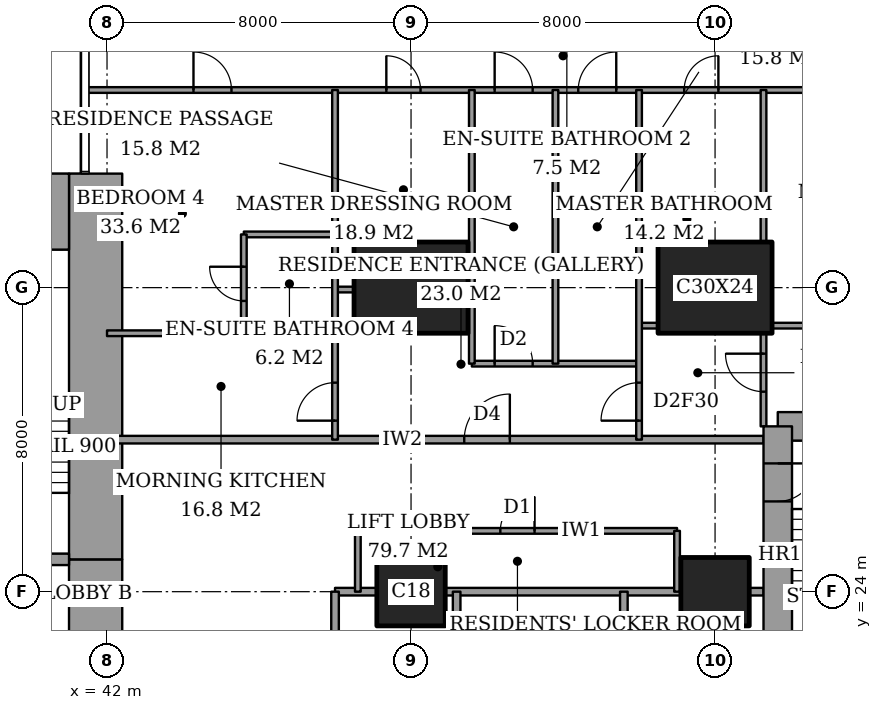
"""IFC4 building model, lengths in metres.
Left out: names, types, materials, properties, quantities, classifications, styles, units other than length and angle.
Written with IfcOpenShell. Run it as: python <this file> out.ifc"""

import sys

from ifc_helpers import new_model, si_unit, direction, frame, frame_2d, origin, origin_2d, place, context, subcontext, project, spatial, rectangle, extrude, element, fill, save


model = new_model("IFC4")
c1 = context("Model", 3, precision=1e-05, world=origin(), true_north=direction((0.0, 1.0)))
c2 = subcontext(c1, "Body", "Model", "MODEL_VIEW")
j1 = project(units=[si_unit("LENGTHUNIT", "METRE"), si_unit("PLANEANGLEUNIT", "RADIAN")], contexts=[c1])
p1 = place(None, origin())
s1 = spatial("IfcSite", under=j1, at=p1, CompositionType="ELEMENT")
p2 = place(p1, origin())
s2 = spatial("IfcBuilding", under=s1, at=p2, CompositionType="ELEMENT")
p3 = place(p2, frame((0.0, 0.0, 207.4)))
s3 = spatial("IfcBuildingStorey", under=s2, at=p3, CompositionType="ELEMENT", Elevation=207.4)
p4 = place(p3, frame((50.0, 24.0, 0.0), z_axis=(0.0, 0.0, 1.0), x_axis=(1.0, 0.0, 0.0)))
e1 = element("IfcColumn", 1, at=p4, inside=s3, PredefinedType="COLUMN", context=c2, shape_type="SweptSolid", body=[
    extrude(rectangle(XDim=1.8, YDim=1.8, at=origin_2d()), origin(), (0.0, 0.0, 1.0), 3.6),
])
p5 = place(p3, frame((50.0, 32.0, 0.0), z_axis=(0.0, 0.0, 1.0), x_axis=(1.0, 0.0, 0.0)))
e2 = element("IfcColumn", 2, at=p5, inside=s3, PredefinedType="COLUMN", context=c2, shape_type="SweptSolid", body=[
    extrude(rectangle(XDim=3.0, YDim=2.4, at=origin_2d()), origin(), (0.0, 0.0, 1.0), 3.6),
])
p6 = place(p3, frame((58.0, 24.0, 0.0), z_axis=(0.0, 0.0, 1.0), x_axis=(1.0, 0.0, 0.0)))
e3 = element("IfcColumn", 3, at=p6, inside=s3, PredefinedType="COLUMN", context=c2, shape_type="SweptSolid", body=[
    extrude(rectangle(XDim=1.8, YDim=1.8, at=origin_2d()), origin(), (0.0, 0.0, 1.0), 3.6),
])
p7 = place(p3, frame((58.0, 32.0, 0.0), z_axis=(0.0, 0.0, 1.0), x_axis=(1.0, 0.0, 0.0)))
e4 = element("IfcColumn", 4, at=p7, inside=s3, PredefinedType="COLUMN", context=c2, shape_type="SweptSolid", body=[
    extrude(rectangle(XDim=3.0, YDim=2.4, at=origin_2d()), origin(), (0.0, 0.0, 1.0), 3.6),
])
p8 = place(p3, frame((37.85, 34.0, 0.0), z_axis=(0.0, 0.0, 1.0), x_axis=(1.0, 0.0, 0.0)))
e5 = element("IfcWall", 5, at=p8, inside=s3, PredefinedType="SHEAR", context=c2, shape_type="SweptSolid", body=[
    extrude(rectangle(XDim=3.15, YDim=2.0, at=frame_2d((1.575, 0.0))), origin(), (0.0, 0.0, 1.0), 3.6),
])
p9 = place(p3, frame((41.7, 13.0, 0.0), z_axis=(0.0, 0.0, 1.0), x_axis=(0.0, 1.0, 0.0)))
e6 = element("IfcWall", 6, at=p9, inside=s3, PredefinedType="SHEAR", context=c2, shape_type="SweptSolid", body=[
    extrude(rectangle(XDim=11.85, YDim=1.4, at=frame_2d((5.925, 0.0))), origin(), (0.0, 0.0, 1.0), 3.6),
])
p10 = place(p9, frame((7.5, 0.0, 0.0)))
e7 = element("IfcOpeningElement", 7, at=p10, cuts=e6, PredefinedType="OPENING", context=c2, shape_type="SweptSolid", body=[
    extrude(rectangle(XDim=1.8, YDim=2.4, at=frame_2d((0.9, 1.2))), frame((0.0, 0.71, 0.0), z_axis=(0.0, -1.0, 0.0), x_axis=(1.0, 0.0, 0.0)), (0.0, 0.0, 1.0), 1.42),
])
p11 = place(p3, frame((41.7, 24.85, 0.0), z_axis=(0.0, 0.0, 1.0), x_axis=(0.0, 1.0, 0.0)))
e8 = element("IfcWall", 8, at=p11, inside=s3, PredefinedType="SHEAR", context=c2, shape_type="SweptSolid", body=[
    extrude(rectangle(XDim=10.15, YDim=1.4, at=frame_2d((5.075, 0.0))), origin(), (0.0, 0.0, 1.0), 3.6),
])
p12 = place(p3, frame((37.85, 24.85, 0.0), z_axis=(0.0, 0.0, 1.0), x_axis=(1.0, 0.0, 0.0)))
e9 = element("IfcWall", 9, at=p12, inside=s3, PredefinedType="SHEAR", context=c2, shape_type="SweptSolid", body=[
    extrude(rectangle(XDim=3.15, YDim=0.3, at=frame_2d((1.575, 0.0))), origin(), (0.0, 0.0, 1.0), 3.6),
])
p13 = place(p12, frame((0.95, 0.0, 0.0)))
e10 = element("IfcOpeningElement", 10, at=p13, cuts=e9, PredefinedType="OPENING", context=c2, shape_type="SweptSolid", body=[
    extrude(rectangle(XDim=1.0, YDim=2.1, at=frame_2d((0.5, 1.05))), frame((0.0, 0.16, 0.0), z_axis=(0.0, -1.0, 0.0), x_axis=(1.0, 0.0, 0.0)), (0.0, 0.0, 1.0), 0.32),
])
p14 = place(p3, frame((64.1, 28.35, 0.0), z_axis=(0.0, 0.0, 1.0), x_axis=(-1.0, 0.0, 0.0)))
e11 = element("IfcWall", 11, at=p14, inside=s3, PredefinedType="SHEAR", context=c2, shape_type="SweptSolid", body=[
    extrude(rectangle(XDim=4.45, YDim=0.75, at=frame_2d((2.225, 0.0))), origin(), (0.0, 0.0, 1.0), 3.6),
])
p15 = place(p3, frame((59.65, 28.35, 0.0), z_axis=(0.0, 0.0, 1.0), x_axis=(0.0, -1.0, 0.0)))
e12 = element("IfcWall", 12, at=p15, inside=s3, PredefinedType="SHEAR", context=c2, shape_type="SweptSolid", body=[
    extrude(rectangle(XDim=8.7, YDim=0.75, at=frame_2d((4.35, 0.0))), origin(), (0.0, 0.0, 1.0), 3.6),
])
p16 = place(p15, frame((0.975, 0.0, 0.0)))
e13 = element("IfcOpeningElement", 13, at=p16, cuts=e12, PredefinedType="OPENING", context=c2, shape_type="SweptSolid", body=[
    extrude(rectangle(XDim=1.0, YDim=2.1, at=frame_2d((0.5, 1.05))), frame((0.0, 0.385, 0.0), z_axis=(0.0, -1.0, 0.0), x_axis=(1.0, 0.0, 0.0)), (0.0, 0.0, 1.0), 0.77),
])
p17 = place(p3, frame((48.0, 24.0, 0.0), z_axis=(0.0, 0.0, 1.0), x_axis=(1.0, 0.0, 0.0)))
e14 = element("IfcWall", 14, at=p17, inside=s3, PredefinedType="PARTITIONING", context=c2, shape_type="SweptSolid", body=[
    extrude(rectangle(XDim=1.1, YDim=0.2, at=frame_2d((0.55, 0.0))), origin(), (0.0, 0.0, 1.0), 3.35),
])
p18 = place(p3, frame((50.9, 24.0, 0.0), z_axis=(0.0, 0.0, 1.0), x_axis=(1.0, 0.0, 0.0)))
e15 = element("IfcWall", 15, at=p18, inside=s3, PredefinedType="PARTITIONING", context=c2, shape_type="SweptSolid", body=[
    extrude(rectangle(XDim=6.2, YDim=0.2, at=frame_2d((3.1, 0.0))), origin(), (0.0, 0.0, 1.0), 3.35),
])
p19 = place(p3, frame((58.9, 24.0, 0.0), z_axis=(0.0, 0.0, 1.0), x_axis=(1.0, 0.0, 0.0)))
e16 = element("IfcWall", 16, at=p19, inside=s3, PredefinedType="PARTITIONING", context=c2, shape_type="SweptSolid", body=[
    extrude(rectangle(XDim=0.375, YDim=0.2, at=frame_2d((0.188, 0.0))), origin(), (0.0, 0.0, 1.0), 3.35),
])
p20 = place(p3, frame((48.6, 25.6, 0.0), z_axis=(0.0, 0.0, 1.0), x_axis=(1.0, 0.0, 0.0)))
e17 = element("IfcWall", 17, at=p20, inside=s3, PredefinedType="PARTITIONING", context=c2, shape_type="SweptSolid", body=[
    extrude(rectangle(XDim=8.4, YDim=0.15, at=frame_2d((4.2, 0.0))), origin(), (0.0, 0.0, 1.0), 3.35),
])
p21 = place(p20, frame((3.75, 0.0, 0.0)))
e18 = element("IfcOpeningElement", 18, at=p21, cuts=e17, PredefinedType="OPENING", context=c2, shape_type="SweptSolid", body=[
    extrude(rectangle(XDim=0.9, YDim=2.1, at=frame_2d((0.45, 1.05))), frame((0.0, 0.085, 0.0), z_axis=(0.0, -1.0, 0.0), x_axis=(1.0, 0.0, 0.0)), (0.0, 0.0, 1.0), 0.17),
])
p22 = place(p3, frame((42.0, 28.0, 0.0), z_axis=(0.0, 0.0, 1.0), x_axis=(1.0, 0.0, 0.0)))
e19 = element("IfcWall", 19, at=p22, inside=s3, PredefinedType="PARTITIONING", context=c2, shape_type="SweptSolid", body=[
    extrude(rectangle(XDim=17.275, YDim=0.2, at=frame_2d((8.637, 0.0))), origin(), (0.0, 0.0, 1.0), 3.35),
])
p23 = place(p22, frame((9.4, 0.0, 0.0)))
e20 = element("IfcOpeningElement", 20, at=p23, cuts=e19, PredefinedType="OPENING", context=c2, shape_type="SweptSolid", body=[
    extrude(rectangle(XDim=1.2, YDim=2.4, at=frame_2d((0.6, 1.2))), frame((0.0, 0.11, 0.0), z_axis=(0.0, -1.0, 0.0), x_axis=(1.0, 0.0, 0.0)), (0.0, 0.0, 1.0), 0.22),
])
p24 = place(p3, frame((51.6, 30.0, 0.0), z_axis=(0.0, 0.0, 1.0), x_axis=(1.0, 0.0, 0.0)))
e21 = element("IfcWall", 21, at=p24, inside=s3, PredefinedType="PARTITIONING", context=c2, shape_type="SweptSolid", body=[
    extrude(rectangle(XDim=4.4, YDim=0.15, at=frame_2d((2.2, 0.0))), origin(), (0.0, 0.0, 1.0), 3.35),
])
p25 = place(p24, frame((0.6, 0.0, 0.0)))
e22 = element("IfcOpeningElement", 22, at=p25, cuts=e21, PredefinedType="OPENING", context=c2, shape_type="SweptSolid", body=[
    extrude(rectangle(XDim=1.0, YDim=2.1, at=frame_2d((0.5, 1.05))), frame((0.0, 0.085, 0.0), z_axis=(0.0, -1.0, 0.0), x_axis=(1.0, 0.0, 0.0)), (0.0, 0.0, 1.0), 0.17),
])
p26 = place(p3, frame((42.0, 30.8, 0.0), z_axis=(0.0, 0.0, 1.0), x_axis=(1.0, 0.0, 0.0)))
e23 = element("IfcWall", 23, at=p26, inside=s3, PredefinedType="PARTITIONING", context=c2, shape_type="SweptSolid", body=[
    extrude(rectangle(XDim=6.0, YDim=0.15, at=frame_2d((3.0, 0.0))), origin(), (0.0, 0.0, 1.0), 3.35),
])
p27 = place(p3, frame((56.0, 31.0, 0.0), z_axis=(0.0, 0.0, 1.0), x_axis=(1.0, 0.0, 0.0)))
e24 = element("IfcWall", 24, at=p27, inside=s3, PredefinedType="PARTITIONING", context=c2, shape_type="SweptSolid", body=[
    extrude(rectangle(XDim=0.5, YDim=0.15, at=frame_2d((0.25, 0.0))), origin(), (0.0, 0.0, 1.0), 3.35),
])
p28 = place(p3, frame((59.5, 31.0, 0.0), z_axis=(0.0, 0.0, 1.0), x_axis=(1.0, 0.0, 0.0)))
e25 = element("IfcWall", 25, at=p28, inside=s3, PredefinedType="PARTITIONING", context=c2, shape_type="SweptSolid", body=[
    extrude(rectangle(XDim=6.95, YDim=0.15, at=frame_2d((3.475, 0.0))), origin(), (0.0, 0.0, 1.0), 3.35),
])
p29 = place(p3, frame((48.0, 31.95, 0.0), z_axis=(0.0, 0.0, 1.0), x_axis=(1.0, 0.0, 0.0)))
e26 = element("IfcWall", 26, at=p29, inside=s3, PredefinedType="PARTITIONING", context=c2, shape_type="SweptSolid", body=[
    extrude(rectangle(XDim=0.5, YDim=0.15, at=frame_2d((0.25, 0.0))), origin(), (0.0, 0.0, 1.0), 2.634),
])
p30 = place(p3, frame((45.6, 33.4, 0.0), z_axis=(0.0, 0.0, 1.0), x_axis=(1.0, 0.0, 0.0)))
e27 = element("IfcWall", 27, at=p30, inside=s3, PredefinedType="PARTITIONING", context=c2, shape_type="SweptSolid", body=[
    extrude(rectangle(XDim=2.4, YDim=0.15, at=frame_2d((1.2, 0.0))), origin(), (0.0, 0.0, 1.0), 3.35),
])
p31 = place(p3, frame((41.439, 37.2, 0.0), z_axis=(0.0, 0.0, 1.0), x_axis=(1.0, 0.0, 0.0)))
e28 = element("IfcWall", 28, at=p31, inside=s3, PredefinedType="PARTITIONING", context=c2, shape_type="SweptSolid", body=[
    extrude(rectangle(XDim=25.011, YDim=0.15, at=frame_2d((12.505, 0.0))), origin(), (0.0, 0.0, 1.0), 3.35),
])
p32 = place(p31, frame((10.761, 0.0, 0.0)))
e29 = element("IfcOpeningElement", 29, at=p32, cuts=e28, PredefinedType="OPENING", context=c2, shape_type="SweptSolid", body=[
    extrude(rectangle(XDim=1.0, YDim=2.1, at=frame_2d((0.5, 1.05))), frame((0.0, 0.085, 0.0), z_axis=(0.0, -1.0, 0.0), x_axis=(1.0, 0.0, 0.0)), (0.0, 0.0, 1.0), 0.17),
])
p33 = place(p31, frame((20.924, 0.0, 0.0)))
e30 = element("IfcOpeningElement", 30, at=p33, cuts=e28, PredefinedType="OPENING", context=c2, shape_type="SweptSolid", body=[
    extrude(rectangle(XDim=1.0, YDim=2.1, at=frame_2d((0.5, 1.05))), frame((0.0, 0.085, 0.0), z_axis=(0.0, -1.0, 0.0), x_axis=(1.0, 0.0, 0.0)), (0.0, 0.0, 1.0), 0.17),
])
p34 = place(p31, frame((15.749, 0.0, 0.0)))
e31 = element("IfcOpeningElement", 31, at=p34, cuts=e28, PredefinedType="OPENING", context=c2, shape_type="SweptSolid", body=[
    extrude(rectangle(XDim=0.9, YDim=2.1, at=frame_2d((0.45, 1.05))), frame((0.0, 0.085, 0.0), z_axis=(0.0, -1.0, 0.0), x_axis=(1.0, 0.0, 0.0)), (0.0, 0.0, 1.0), 0.17),
])
p35 = place(p31, frame((12.961, 0.0, 0.0)))
e32 = element("IfcOpeningElement", 32, at=p35, cuts=e28, PredefinedType="OPENING", context=c2, shape_type="SweptSolid", body=[
    extrude(rectangle(XDim=1.0, YDim=2.1, at=frame_2d((0.5, 1.05))), frame((0.0, 0.085, 0.0), z_axis=(0.0, -1.0, 0.0), x_axis=(1.0, 0.0, 0.0)), (0.0, 0.0, 1.0), 0.17),
])
p36 = place(p31, frame((7.911, 0.0, 0.0)))
e33 = element("IfcOpeningElement", 33, at=p36, cuts=e28, PredefinedType="OPENING", context=c2, shape_type="SweptSolid", body=[
    extrude(rectangle(XDim=0.9, YDim=2.1, at=frame_2d((0.45, 1.05))), frame((0.0, 0.085, 0.0), z_axis=(0.0, -1.0, 0.0), x_axis=(1.0, 0.0, 0.0)), (0.0, 0.0, 1.0), 0.17),
])
p37 = place(p31, frame((2.836, 0.0, 0.0)))
e34 = element("IfcOpeningElement", 34, at=p37, cuts=e28, PredefinedType="OPENING", context=c2, shape_type="SweptSolid", body=[
    extrude(rectangle(XDim=1.0, YDim=2.1, at=frame_2d((0.5, 1.05))), frame((0.0, 0.085, 0.0), z_axis=(0.0, -1.0, 0.0), x_axis=(1.0, 0.0, 0.0)), (0.0, 0.0, 1.0), 0.17),
])
p38 = place(p3, frame((45.6, 30.8, 0.0), z_axis=(0.0, 0.0, 1.0), x_axis=(0.0, 1.0, 0.0)))
e35 = element("IfcWall", 35, at=p38, inside=s3, PredefinedType="PARTITIONING", context=c2, shape_type="SweptSolid", body=[
    extrude(rectangle(XDim=2.6, YDim=0.15, at=frame_2d((1.3, 0.0))), origin(), (0.0, 0.0, 1.0), 3.35),
])
p39 = place(p38, frame((0.85, 0.0, 0.0)))
e36 = element("IfcOpeningElement", 36, at=p39, cuts=e35, PredefinedType="OPENING", context=c2, shape_type="SweptSolid", body=[
    extrude(rectangle(XDim=0.9, YDim=2.1, at=frame_2d((0.45, 1.05))), frame((0.0, 0.085, 0.0), z_axis=(0.0, -1.0, 0.0), x_axis=(1.0, 0.0, 0.0)), (0.0, 0.0, 1.0), 0.17),
])
p40 = place(p3, frame((48.0, 18.0, 0.0), z_axis=(0.0, 0.0, 1.0), x_axis=(0.0, 1.0, 0.0)))
e37 = element("IfcWall", 37, at=p40, inside=s3, PredefinedType="PARTITIONING", context=c2, shape_type="SweptSolid", body=[
    extrude(rectangle(XDim=6.0, YDim=0.2, at=frame_2d((3.0, 0.0))), origin(), (0.0, 0.0, 1.0), 3.35),
])
p41 = place(p40, frame((3.4, 0.0, 0.0)))
e38 = element("IfcOpeningElement", 38, at=p41, cuts=e37, PredefinedType="OPENING", context=c2, shape_type="SweptSolid", body=[
    extrude(rectangle(XDim=1.2, YDim=2.4, at=frame_2d((0.6, 1.2))), frame((0.0, 0.11, 0.0), z_axis=(0.0, -1.0, 0.0), x_axis=(1.0, 0.0, 0.0)), (0.0, 0.0, 1.0), 0.22),
])
p42 = place(p40, frame((0.55, 0.0, 0.0)))
e39 = element("IfcOpeningElement", 39, at=p42, cuts=e37, PredefinedType="OPENING", context=c2, shape_type="SweptSolid", body=[
    extrude(rectangle(XDim=0.9, YDim=2.1, at=frame_2d((0.45, 1.05))), frame((0.0, 0.11, 0.0), z_axis=(0.0, -1.0, 0.0), x_axis=(1.0, 0.0, 0.0)), (0.0, 0.0, 1.0), 0.22),
])
p43 = place(p3, frame((48.0, 28.0, 0.0), z_axis=(0.0, 0.0, 1.0), x_axis=(0.0, 1.0, 0.0)))
e40 = element("IfcWall", 40, at=p43, inside=s3, PredefinedType="PARTITIONING", context=c2, shape_type="SweptSolid", body=[
    extrude(rectangle(XDim=9.2, YDim=0.15, at=frame_2d((4.6, 0.0))), origin(), (0.0, 0.0, 1.0), 3.35),
])
p44 = place(p43, frame((0.5, 0.0, 0.0)))
e41 = element("IfcOpeningElement", 41, at=p44, cuts=e40, PredefinedType="OPENING", context=c2, shape_type="SweptSolid", body=[
    extrude(rectangle(XDim=1.0, YDim=2.1, at=frame_2d((0.5, 1.05))), frame((0.0, 0.085, 0.0), z_axis=(0.0, -1.0, 0.0), x_axis=(1.0, 0.0, 0.0)), (0.0, 0.0, 1.0), 0.17),
])
p45 = place(p3, frame((48.6, 24.0, 0.0), z_axis=(0.0, 0.0, 1.0), x_axis=(0.0, 1.0, 0.0)))
e42 = element("IfcWall", 42, at=p45, inside=s3, PredefinedType="PARTITIONING", context=c2, shape_type="SweptSolid", body=[
    extrude(rectangle(XDim=1.6, YDim=0.15, at=frame_2d((0.8, 0.0))), origin(), (0.0, 0.0, 1.0), 3.35),
])
p46 = place(p3, frame((51.2, 21.6, 0.0), z_axis=(0.0, 0.0, 1.0), x_axis=(0.0, 1.0, 0.0)))
e43 = element("IfcWall", 43, at=p46, inside=s3, PredefinedType="PARTITIONING", context=c2, shape_type="SweptSolid", body=[
    extrude(rectangle(XDim=2.4, YDim=0.2, at=frame_2d((1.2, 0.0))), origin(), (0.0, 0.0, 1.0), 3.35),
])
for number, where, z_axis, x_axis in (
    (44, (51.6, 30.0, 0.0), (0.0, 0.0, 1.0), (0.0, 1.0, 0.0)),
    (45, (53.8, 30.0, 0.0), (0.0, 0.0, 1.0), (0.0, 1.0, 0.0)),
):
    element("IfcWall", number, at=place(p3, frame(where, z_axis=z_axis, x_axis=x_axis)), inside=s3, PredefinedType="PARTITIONING", context=c2, shape_type="SweptSolid", body=[
        extrude(rectangle(XDim=7.2, YDim=0.15, at=frame_2d((3.6, 0.0))), origin(), (0.0, 0.0, 1.0), 3.35),
    ])
p47 = place(p3, frame((55.6, 21.6, 0.0), z_axis=(0.0, 0.0, 1.0), x_axis=(0.0, 1.0, 0.0)))
e46 = element("IfcWall", 46, at=p47, inside=s3, PredefinedType="PARTITIONING", context=c2, shape_type="SweptSolid", body=[
    extrude(rectangle(XDim=2.4, YDim=0.2, at=frame_2d((1.2, 0.0))), origin(), (0.0, 0.0, 1.0), 3.35),
])
p48 = place(p3, frame((56.0, 28.0, 0.0), z_axis=(0.0, 0.0, 1.0), x_axis=(0.0, 1.0, 0.0)))
e47 = element("IfcWall", 47, at=p48, inside=s3, PredefinedType="PARTITIONING", context=c2, shape_type="SweptSolid", body=[
    extrude(rectangle(XDim=9.2, YDim=0.15, at=frame_2d((4.6, 0.0))), origin(), (0.0, 0.0, 1.0), 3.35),
])
p49 = place(p48, frame((0.5, 0.0, 0.0)))
e48 = element("IfcOpeningElement", 48, at=p49, cuts=e47, PredefinedType="OPENING", context=c2, shape_type="SweptSolid", body=[
    extrude(rectangle(XDim=1.0, YDim=2.1, at=frame_2d((0.5, 1.05))), frame((0.0, 0.085, 0.0), z_axis=(0.0, -1.0, 0.0), x_axis=(1.0, 0.0, 0.0)), (0.0, 0.0, 1.0), 0.17),
])
p50 = place(p3, frame((57.0, 24.0, 0.0), z_axis=(0.0, 0.0, 1.0), x_axis=(0.0, 1.0, 0.0)))
e49 = element("IfcWall", 49, at=p50, inside=s3, PredefinedType="PARTITIONING", context=c2, shape_type="SweptSolid", body=[
    extrude(rectangle(XDim=1.6, YDim=0.15, at=frame_2d((0.8, 0.0))), origin(), (0.0, 0.0, 1.0), 3.35),
])
p51 = place(p3, frame((59.275, 28.35, 0.0), z_axis=(0.0, 0.0, 1.0), x_axis=(0.0, 1.0, 0.0)))
e50 = element("IfcWall", 50, at=p51, inside=s3, PredefinedType="PARTITIONING", context=c2, shape_type="SweptSolid", body=[
    extrude(rectangle(XDim=2.45, YDim=0.15, at=frame_2d((1.225, 0.0))), origin(), (0.0, 0.0, 1.0), 3.35),
])
p52 = place(p51, frame((0.913, 0.0, 0.0)))
e51 = element("IfcOpeningElement", 51, at=p52, cuts=e50, PredefinedType="OPENING", context=c2, shape_type="SweptSolid", body=[
    extrude(rectangle(XDim=1.0, YDim=2.1, at=frame_2d((0.5, 1.05))), frame((0.0, 0.085, 0.0), z_axis=(0.0, -1.0, 0.0), x_axis=(1.0, 0.0, 0.0)), (0.0, 0.0, 1.0), 0.17),
])
p53 = place(p3, frame((59.275, 33.2, 0.0), z_axis=(0.0, 0.0, 1.0), x_axis=(0.0, 1.0, 0.0)))
e52 = element("IfcWall", 52, at=p53, inside=s3, PredefinedType="PARTITIONING", context=c2, shape_type="SweptSolid", body=[
    extrude(rectangle(XDim=4.0, YDim=0.15, at=frame_2d((2.0, 0.0))), origin(), (0.0, 0.0, 1.0), 3.35),
])
p54 = place(p32, origin())
e53 = element("IfcDoor", 53, at=p54, inside=s3, OperationType="SINGLE_SWING_RIGHT", PredefinedType="DOOR", context=c2, shape_type="SweptSolid", body=[
    extrude(rectangle(XDim=1.0, YDim=2.1, at=frame_2d((0.5, 1.05))), frame((0.0, 0.025, 0.0), z_axis=(0.0, -1.0, 0.0), x_axis=(1.0, 0.0, 0.0)), (0.0, 0.0, 1.0), 0.05),
])
fill(e29, e53)
p55 = place(p52, origin())
e54 = element("IfcDoor", 54, at=p55, inside=s3, OperationType="SINGLE_SWING_LEFT", PredefinedType="DOOR", context=c2, shape_type="SweptSolid", body=[
    extrude(rectangle(XDim=1.0, YDim=2.1, at=frame_2d((0.5, 1.05))), frame((0.0, 0.025, 0.0), z_axis=(0.0, -1.0, 0.0), x_axis=(1.0, 0.0, 0.0)), (0.0, 0.0, 1.0), 0.05),
])
fill(e51, e54)
p56 = place(p34, origin())
e55 = element("IfcDoor", 55, at=p56, inside=s3, OperationType="SINGLE_SWING_LEFT", PredefinedType="DOOR", context=c2, shape_type="SweptSolid", body=[
    extrude(rectangle(XDim=0.9, YDim=2.1, at=frame_2d((0.45, 1.05))), frame((0.0, 0.025, 0.0), z_axis=(0.0, -1.0, 0.0), x_axis=(1.0, 0.0, 0.0)), (0.0, 0.0, 1.0), 0.05),
])
fill(e31, e55)
p57 = place(p49, origin())
e56 = element("IfcDoor", 56, at=p57, inside=s3, OperationType="SINGLE_SWING_RIGHT", PredefinedType="DOOR", context=c2, shape_type="SweptSolid", body=[
    extrude(rectangle(XDim=1.0, YDim=2.1, at=frame_2d((0.5, 1.05))), frame((0.0, 0.025, 0.0), z_axis=(0.0, -1.0, 0.0), x_axis=(1.0, 0.0, 0.0)), (0.0, 0.0, 1.0), 0.05),
])
fill(e48, e56)
p58 = place(p23, origin())
e57 = element("IfcDoor", 57, at=p58, inside=s3, OperationType="SINGLE_SWING_LEFT", PredefinedType="DOOR", context=c2, shape_type="SweptSolid", body=[
    extrude(rectangle(XDim=1.2, YDim=2.4, at=frame_2d((0.6, 1.2))), frame((0.0, 0.025, 0.0), z_axis=(0.0, -1.0, 0.0), x_axis=(1.0, 0.0, 0.0)), (0.0, 0.0, 1.0), 0.05),
])
fill(e20, e57)
p59 = place(p35, origin())
e58 = element("IfcDoor", 58, at=p59, inside=s3, OperationType="SINGLE_SWING_LEFT", PredefinedType="DOOR", context=c2, shape_type="SweptSolid", body=[
    extrude(rectangle(XDim=1.0, YDim=2.1, at=frame_2d((0.5, 1.05))), frame((0.0, 0.025, 0.0), z_axis=(0.0, -1.0, 0.0), x_axis=(1.0, 0.0, 0.0)), (0.0, 0.0, 1.0), 0.05),
])
fill(e32, e58)
p60 = place(p25, origin())
e59 = element("IfcDoor", 59, at=p60, inside=s3, OperationType="SINGLE_SWING_RIGHT", PredefinedType="DOOR", context=c2, shape_type="SweptSolid", body=[
    extrude(rectangle(XDim=1.0, YDim=2.1, at=frame_2d((0.5, 1.05))), frame((0.0, 0.025, 0.0), z_axis=(0.0, -1.0, 0.0), x_axis=(1.0, 0.0, 0.0)), (0.0, 0.0, 1.0), 0.05),
])
fill(e22, e59)
p61 = place(p36, origin())
e60 = element("IfcDoor", 60, at=p61, inside=s3, OperationType="SINGLE_SWING_RIGHT", PredefinedType="DOOR", context=c2, shape_type="SweptSolid", body=[
    extrude(rectangle(XDim=0.9, YDim=2.1, at=frame_2d((0.45, 1.05))), frame((0.0, 0.025, 0.0), z_axis=(0.0, -1.0, 0.0), x_axis=(1.0, 0.0, 0.0)), (0.0, 0.0, 1.0), 0.05),
])
fill(e33, e60)
p62 = place(p39, origin())
e61 = element("IfcDoor", 61, at=p62, inside=s3, OperationType="SINGLE_SWING_LEFT", PredefinedType="DOOR", context=c2, shape_type="SweptSolid", body=[
    extrude(rectangle(XDim=0.9, YDim=2.1, at=frame_2d((0.45, 1.05))), frame((0.0, 0.025, 0.0), z_axis=(0.0, -1.0, 0.0), x_axis=(1.0, 0.0, 0.0)), (0.0, 0.0, 1.0), 0.05),
])
fill(e36, e61)
p63 = place(p37, origin())
e62 = element("IfcDoor", 62, at=p63, inside=s3, OperationType="SINGLE_SWING_RIGHT", PredefinedType="DOOR", context=c2, shape_type="SweptSolid", body=[
    extrude(rectangle(XDim=1.0, YDim=2.1, at=frame_2d((0.5, 1.05))), frame((0.0, 0.025, 0.0), z_axis=(0.0, -1.0, 0.0), x_axis=(1.0, 0.0, 0.0)), (0.0, 0.0, 1.0), 0.05),
])
fill(e34, e62)
p64 = place(p44, origin())
e63 = element("IfcDoor", 63, at=p64, inside=s3, OperationType="SINGLE_SWING_RIGHT", PredefinedType="DOOR", context=c2, shape_type="SweptSolid", body=[
    extrude(rectangle(XDim=1.0, YDim=2.1, at=frame_2d((0.5, 1.05))), frame((0.0, 0.025, 0.0), z_axis=(0.0, -1.0, 0.0), x_axis=(1.0, 0.0, 0.0)), (0.0, 0.0, 1.0), 0.05),
])
fill(e41, e63)
p65 = place(p21, origin())
e64 = element("IfcDoor", 64, at=p65, inside=s3, OperationType="SINGLE_SWING_LEFT", PredefinedType="DOOR", context=c2, shape_type="SweptSolid", body=[
    extrude(rectangle(XDim=0.9, YDim=2.1, at=frame_2d((0.45, 1.05))), frame((0.0, 0.025, 0.0), z_axis=(0.0, -1.0, 0.0), x_axis=(1.0, 0.0, 0.0)), (0.0, 0.0, 1.0), 0.05),
])
fill(e18, e64)
p66 = place(p16, origin())
e65 = element("IfcDoor", 65, at=p66, inside=s3, OperationType="SINGLE_SWING_RIGHT", PredefinedType="DOOR", context=c2, shape_type="SweptSolid", body=[
    extrude(rectangle(XDim=1.0, YDim=2.1, at=frame_2d((0.5, 1.05))), frame((0.0, 0.025, 0.0), z_axis=(0.0, -1.0, 0.0), x_axis=(1.0, 0.0, 0.0)), (0.0, 0.0, 1.0), 0.05),
])
fill(e13, e65)
save(model, sys.argv[1])
